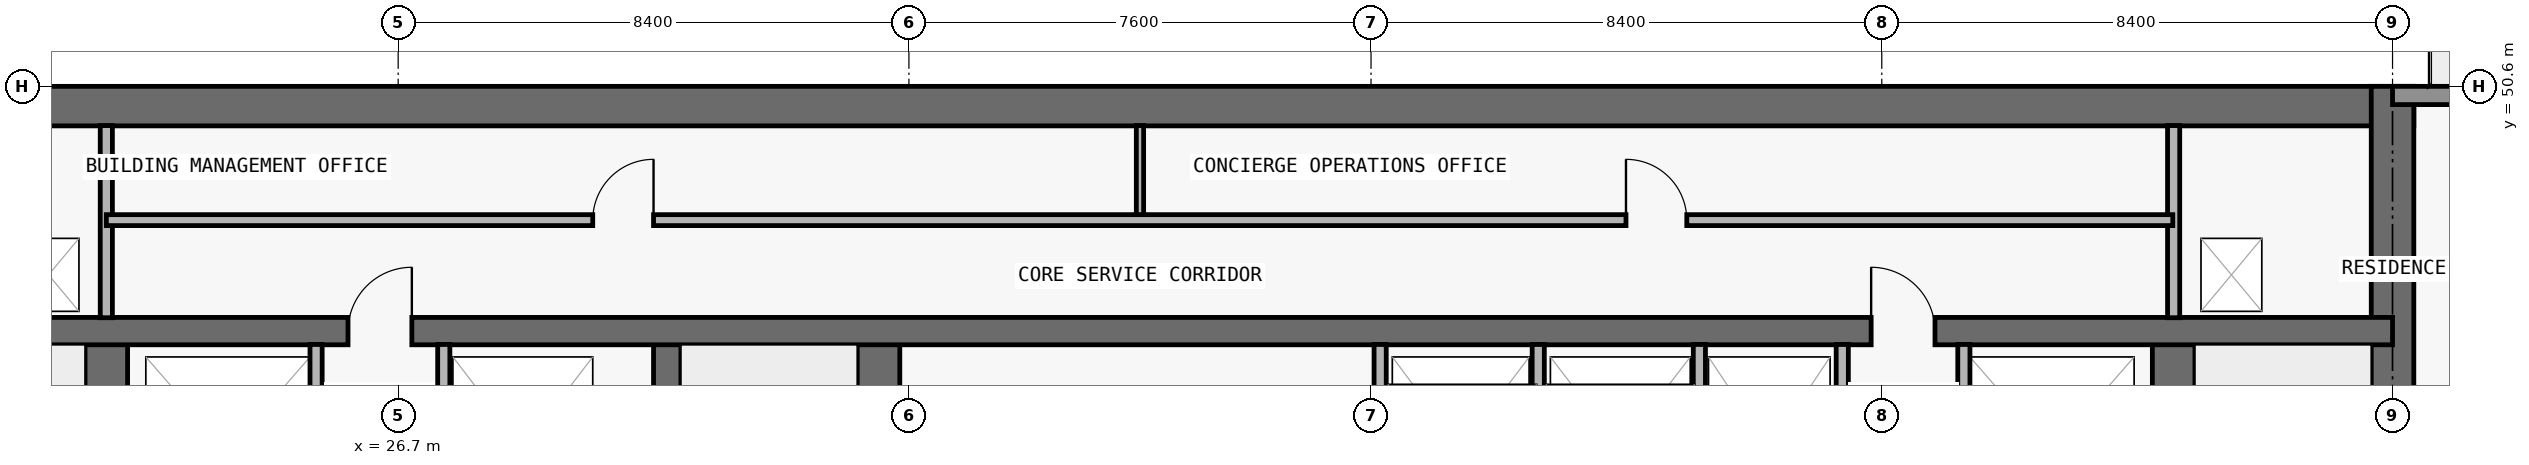
"""IFC4 building model, lengths in metres.
Left out: names, types, materials, properties, quantities, classifications, styles, units other than length and angle.
Written with IfcOpenShell. Run it as: python <this file> out.ifc"""

import sys

from ifc_helpers import new_model, si_unit, direction, frame, frame_2d, origin, place, context, subcontext, project, spatial, rectangle, extrude, element, fill, save


model = new_model("IFC4")
c1 = context("Model", 3, precision=1e-05, world=origin(), true_north=direction((0.0, 1.0)))
c2 = subcontext(c1, "Body", "Model", "MODEL_VIEW")
j1 = project(units=[si_unit("LENGTHUNIT", "METRE"), si_unit("PLANEANGLEUNIT", "RADIAN")], contexts=[c1])
p1 = place(None, origin())
s1 = spatial("IfcSite", under=j1, at=p1, CompositionType="ELEMENT")
p2 = place(p1, origin())
s2 = spatial("IfcBuilding", under=s1, at=p2, CompositionType="ELEMENT")
p3 = place(p2, frame((0.0, 0.0, 157.2)))
s3 = spatial("IfcBuildingStorey", under=s2, at=p3, CompositionType="ELEMENT", Elevation=157.2)
p4 = place(p3, frame((17.95, 50.275, 0.0), z_axis=(0.0, 0.0, 1.0), x_axis=(1.0, 0.0, 0.0)))
e1 = element("IfcWall", 1, at=p4, inside=s3, PredefinedType="SHEAR", context=c2, shape_type="SweptSolid", body=[
    extrude(rectangle(XDim=41.9, YDim=0.65, at=frame_2d((20.95, 0.0))), origin(), (0.0, 0.0, 1.0), 3.05),
])
p5 = place(p3, frame((59.5, 36.65, 0.0), z_axis=(0.0, 0.0, 1.0), x_axis=(0.0, 1.0, 0.0)))
e2 = element("IfcWall", 2, at=p5, inside=s3, PredefinedType="SHEAR", context=c2, shape_type="SweptSolid", body=[
    extrude(rectangle(XDim=13.95, YDim=0.7, at=frame_2d((6.975, 0.0))), origin(), (0.0, 0.0, 1.0), 3.05),
])
p6 = place(p3, frame((21.9, 37.0, 0.0), z_axis=(0.0, 0.0, 1.0), x_axis=(0.0, 1.0, 0.0)))
e3 = element("IfcWall", 3, at=p6, inside=s3, PredefinedType="SHEAR", context=c2, shape_type="SweptSolid", body=[
    extrude(rectangle(XDim=9.575, YDim=0.7, at=frame_2d((4.788, 0.0))), origin(), (0.0, 0.0, 1.0), 3.05),
])
p7 = place(p6, frame((0.55, 0.0, 0.0)))
e4 = element("IfcOpeningElement", 4, at=p7, cuts=e3, PredefinedType="OPENING", context=c2, shape_type="SweptSolid", body=[
    extrude(rectangle(XDim=1.1, YDim=2.15, at=frame_2d((0.55, 1.075))), frame((0.0, 0.36, 0.0), z_axis=(0.0, -1.0, 0.0), x_axis=(1.0, 0.0, 0.0)), (0.0, 0.0, 1.0), 0.72),
])
p8 = place(p3, frame((55.9, 37.0, 0.0), z_axis=(0.0, 0.0, 1.0), x_axis=(0.0, 1.0, 0.0)))
e5 = element("IfcWall", 5, at=p8, inside=s3, PredefinedType="SHEAR", context=c2, shape_type="SweptSolid", body=[
    extrude(rectangle(XDim=9.575, YDim=0.7, at=frame_2d((4.788, 0.0))), origin(), (0.0, 0.0, 1.0), 3.05),
])
p9 = place(p8, frame((0.55, 0.0, 0.0)))
e6 = element("IfcOpeningElement", 6, at=p9, cuts=e5, PredefinedType="OPENING", context=c2, shape_type="SweptSolid", body=[
    extrude(rectangle(XDim=1.1, YDim=2.15, at=frame_2d((0.55, 1.075))), frame((0.0, 0.36, 0.0), z_axis=(0.0, -1.0, 0.0), x_axis=(1.0, 0.0, 0.0)), (0.0, 0.0, 1.0), 0.72),
])
p10 = place(p3, frame((31.125, 37.0, 0.0), z_axis=(0.0, 0.0, 1.0), x_axis=(0.0, 1.0, 0.0)))
e7 = element("IfcWall", 7, at=p10, inside=s3, PredefinedType="SHEAR", context=c2, shape_type="SweptSolid", body=[
    extrude(rectangle(XDim=9.575, YDim=0.45, at=frame_2d((4.788, 0.0))), origin(), (0.0, 0.0, 1.0), 3.05),
])
p11 = place(p3, frame((34.6, 37.0, 0.0), z_axis=(0.0, 0.0, 1.0), x_axis=(0.0, 1.0, 0.0)))
e8 = element("IfcWall", 8, at=p11, inside=s3, PredefinedType="SHEAR", context=c2, shape_type="SweptSolid", body=[
    extrude(rectangle(XDim=9.575, YDim=0.7, at=frame_2d((4.788, 0.0))), origin(), (0.0, 0.0, 1.0), 3.05),
])
p12 = place(p3, frame((18.3, 46.575, 0.0), z_axis=(0.0, 0.0, 1.0), x_axis=(1.0, 0.0, 0.0)))
e9 = element("IfcWall", 9, at=p12, inside=s3, PredefinedType="SHEAR", context=c2, shape_type="SweptSolid", body=[
    extrude(rectangle(XDim=41.2, YDim=0.45, at=frame_2d((20.6, 0.0))), origin(), (0.0, 0.0, 1.0), 3.05),
])
p13 = place(p12, frame((7.575, 0.0, 0.0)))
e10 = element("IfcOpeningElement", 10, at=p13, cuts=e9, PredefinedType="OPENING", context=c2, shape_type="SweptSolid", body=[
    extrude(rectangle(XDim=1.05, YDim=2.15, at=frame_2d((0.525, 1.075))), frame((0.0, 0.235, 0.0), z_axis=(0.0, -1.0, 0.0), x_axis=(1.0, 0.0, 0.0)), (0.0, 0.0, 1.0), 0.47),
])
p14 = place(p12, frame((32.625, 0.0, 0.0)))
e11 = element("IfcOpeningElement", 11, at=p14, cuts=e9, PredefinedType="OPENING", context=c2, shape_type="SweptSolid", body=[
    extrude(rectangle(XDim=1.05, YDim=2.15, at=frame_2d((0.525, 1.075))), frame((0.0, 0.235, 0.0), z_axis=(0.0, -1.0, 0.0), x_axis=(1.0, 0.0, 0.0)), (0.0, 0.0, 1.0), 0.47),
])
p15 = place(p3, frame((59.5, 50.45, 0.0), z_axis=(0.0, 0.0, 1.0), x_axis=(1.0, 0.0, 0.0)))
e12 = element("IfcWall", 12, at=p15, inside=s3, PredefinedType="STANDARD", context=c2, shape_type="SweptSolid", body=[
    extrude(rectangle(XDim=8.2, YDim=0.3, at=frame_2d((4.1, 0.0))), origin(), (0.0, 0.0, 1.0), 3.05),
])
p16 = place(p15, frame((3.1, 0.0, 0.0)))
e13 = element("IfcOpeningElement", 13, at=p16, cuts=e12, PredefinedType="OPENING", context=c2, shape_type="SweptSolid", body=[
    extrude(rectangle(XDim=2.0, YDim=2.3, at=frame_2d((1.0, 1.15))), frame((0.0, 0.16, 0.0), z_axis=(0.0, -1.0, 0.0), x_axis=(1.0, 0.0, 0.0)), (0.0, 0.0, 1.0), 0.32),
])
p17 = place(p3, frame((21.9, 46.795, 0.0), z_axis=(0.0, 0.0, 1.0), x_axis=(0.0, 1.0, 0.0)))
e14 = element("IfcWall", 14, at=p17, inside=s3, PredefinedType="PARTITIONING", context=c2, shape_type="SweptSolid", body=[
    extrude(rectangle(XDim=3.16, YDim=0.2, at=frame_2d((1.58, 0.0))), origin(), (0.0, 0.0, 1.0), 3.05),
])
for number, where, z_axis, x_axis in (
    (15, (25.35, 43.17, 0.0), (0.0, 0.0, 1.0), (0.0, 1.0, 0.0)),
    (16, (27.45, 43.17, 0.0), (0.0, 0.0, 1.0), (0.0, 1.0, 0.0)),
):
    element("IfcWall", number, at=place(p3, frame(where, z_axis=z_axis, x_axis=x_axis)), inside=s3, PredefinedType="PARTITIONING", context=c2, shape_type="SweptSolid", body=[
        extrude(rectangle(XDim=3.185, YDim=0.2, at=frame_2d((1.593, 0.0))), origin(), (0.0, 0.0, 1.0), 3.05),
    ])
p18 = place(p3, frame((38.9, 48.4, 0.0), z_axis=(0.0, 0.0, 1.0), x_axis=(0.0, 1.0, 0.0)))
e17 = element("IfcWall", 17, at=p18, inside=s3, PredefinedType="PARTITIONING", context=c2, shape_type="SweptSolid", body=[
    extrude(rectangle(XDim=1.555, YDim=0.12, at=frame_2d((0.778, 0.0))), origin(), (0.0, 0.0, 1.0), 3.05),
])
for number, where, z_axis, x_axis in (
    (18, (42.85, 43.17, 0.0), (0.0, 0.0, 1.0), (0.0, 1.0, 0.0)),
    (19, (45.45, 43.17, 0.0), (0.0, 0.0, 1.0), (0.0, 1.0, 0.0)),
    (20, (48.1, 43.17, 0.0), (0.0, 0.0, 1.0), (0.0, 1.0, 0.0)),
    (21, (50.45, 43.17, 0.0), (0.0, 0.0, 1.0), (0.0, 1.0, 0.0)),
    (22, (52.45, 43.17, 0.0), (0.0, 0.0, 1.0), (0.0, 1.0, 0.0)),
):
    element("IfcWall", number, at=place(p3, frame(where, z_axis=z_axis, x_axis=x_axis)), inside=s3, PredefinedType="PARTITIONING", context=c2, shape_type="SweptSolid", body=[
        extrude(rectangle(XDim=3.185, YDim=0.2, at=frame_2d((1.593, 0.0))), origin(), (0.0, 0.0, 1.0), 3.05),
    ])
p19 = place(p3, frame((55.9, 46.795, 0.0), z_axis=(0.0, 0.0, 1.0), x_axis=(0.0, 1.0, 0.0)))
e23 = element("IfcWall", 23, at=p19, inside=s3, PredefinedType="PARTITIONING", context=c2, shape_type="SweptSolid", body=[
    extrude(rectangle(XDim=3.16, YDim=0.2, at=frame_2d((1.58, 0.0))), origin(), (0.0, 0.0, 1.0), 3.05),
])
p20 = place(p3, frame((21.9, 48.4, 0.0), z_axis=(0.0, 0.0, 1.0), x_axis=(1.0, 0.0, 0.0)))
e24 = element("IfcWall", 24, at=p20, inside=s3, PredefinedType="PARTITIONING", context=c2, shape_type="SweptSolid", body=[
    extrude(rectangle(XDim=33.986, YDim=0.18, at=frame_2d((16.993, 0.0))), origin(), (0.0, 0.0, 1.0), 3.05),
])
p21 = place(p20, frame((8.0, 0.0, 0.0)))
e25 = element("IfcOpeningElement", 25, at=p21, cuts=e24, PredefinedType="OPENING", context=c2, shape_type="SweptSolid", body=[
    extrude(rectangle(XDim=1.0, YDim=2.2, at=frame_2d((0.5, 1.1))), frame((0.0, 0.1, 0.0), z_axis=(0.0, -1.0, 0.0), x_axis=(1.0, 0.0, 0.0)), (0.0, 0.0, 1.0), 0.2),
])
p22 = place(p20, frame((24.993, 0.0, 0.0)))
e26 = element("IfcOpeningElement", 26, at=p22, cuts=e24, PredefinedType="OPENING", context=c2, shape_type="SweptSolid", body=[
    extrude(rectangle(XDim=1.0, YDim=2.2, at=frame_2d((0.5, 1.1))), frame((0.0, 0.1, 0.0), z_axis=(0.0, -1.0, 0.0), x_axis=(1.0, 0.0, 0.0)), (0.0, 0.0, 1.0), 0.2),
])
p23 = place(p13, origin())
e27 = element("IfcDoor", 27, at=p23, inside=s3, OperationType="SINGLE_SWING_RIGHT", PredefinedType="DOOR", context=c2, shape_type="SweptSolid", body=[
    extrude(rectangle(XDim=1.05, YDim=2.15, at=frame_2d((0.525, 1.075))), frame((0.0, 0.025, 0.0), z_axis=(0.0, -1.0, 0.0), x_axis=(1.0, 0.0, 0.0)), (0.0, 0.0, 1.0), 0.05),
])
fill(e10, e27)
p24 = place(p14, origin())
e28 = element("IfcDoor", 28, at=p24, inside=s3, OperationType="SINGLE_SWING_LEFT", PredefinedType="DOOR", context=c2, shape_type="SweptSolid", body=[
    extrude(rectangle(XDim=1.05, YDim=2.15, at=frame_2d((0.525, 1.075))), frame((0.0, 0.025, 0.0), z_axis=(0.0, -1.0, 0.0), x_axis=(1.0, 0.0, 0.0)), (0.0, 0.0, 1.0), 0.05),
])
fill(e11, e28)
p25 = place(p21, origin())
e29 = element("IfcDoor", 29, at=p25, inside=s3, OperationType="SINGLE_SWING_RIGHT", PredefinedType="DOOR", context=c2, shape_type="SweptSolid", body=[
    extrude(rectangle(XDim=1.0, YDim=2.2, at=frame_2d((0.5, 1.1))), frame((0.0, 0.025, 0.0), z_axis=(0.0, -1.0, 0.0), x_axis=(1.0, 0.0, 0.0)), (0.0, 0.0, 1.0), 0.05),
])
fill(e25, e29)
p26 = place(p22, origin())
e30 = element("IfcDoor", 30, at=p26, inside=s3, OperationType="SINGLE_SWING_LEFT", PredefinedType="DOOR", context=c2, shape_type="SweptSolid", body=[
    extrude(rectangle(XDim=1.0, YDim=2.2, at=frame_2d((0.5, 1.1))), frame((0.0, 0.025, 0.0), z_axis=(0.0, -1.0, 0.0), x_axis=(1.0, 0.0, 0.0)), (0.0, 0.0, 1.0), 0.05),
])
fill(e26, e30)
save(model, sys.argv[1])
